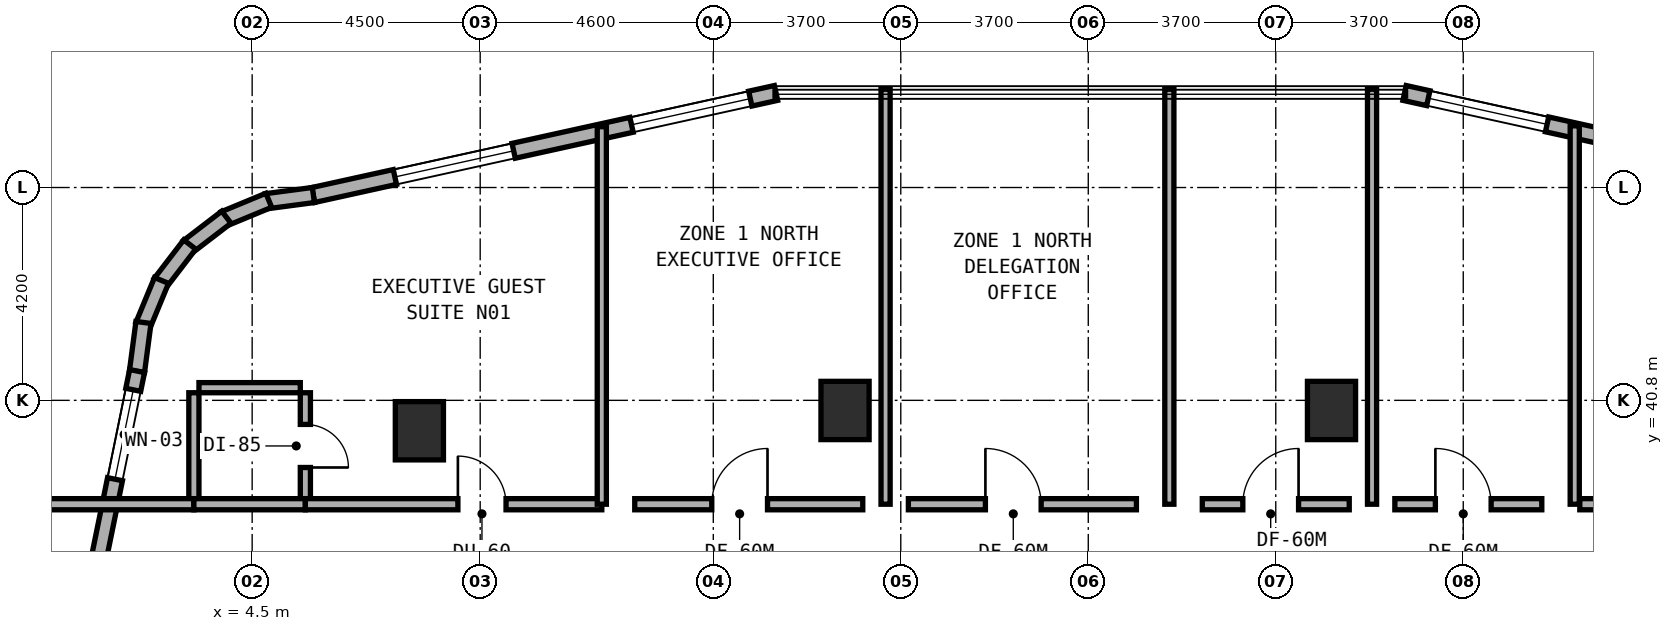
"""IFC4 building model, lengths in metres.
Left out: names, types, materials, properties, quantities, classifications, styles, units other than length and angle.
Written with IfcOpenShell. Run it as: python <this file> out.ifc"""

import sys

from ifc_helpers import new_model, si_unit, direction, frame, frame_2d, origin, origin_2d, place, context, subcontext, project, spatial, rectangle, extrude, element, fill, save


model = new_model("IFC4")
c1 = context("Model", 3, precision=1e-05, world=origin(), true_north=direction((0.0, 1.0)))
c2 = subcontext(c1, "Body", "Model", "MODEL_VIEW")
j1 = project(units=[si_unit("LENGTHUNIT", "METRE"), si_unit("PLANEANGLEUNIT", "RADIAN")], contexts=[c1])
p1 = place(None, origin())
s1 = spatial("IfcSite", under=j1, at=p1, CompositionType="ELEMENT")
p2 = place(p1, origin())
s2 = spatial("IfcBuilding", under=s1, at=p2, CompositionType="ELEMENT")
p3 = place(p2, frame((0.0, 0.0, 73.0)))
s3 = spatial("IfcBuildingStorey", under=s2, at=p3, CompositionType="ELEMENT", Elevation=73.0)
for number, where, z_axis, x_axis in (
    (1, (16.2, 40.6, 0.0), (0.0, 0.0, 1.0), (1.0, 0.0, 0.0)),
    (2, (25.8, 40.6, 0.0), (0.0, 0.0, 1.0), (1.0, 0.0, 0.0)),
    (3, (7.8, 40.2, 0.0), (0.0, 0.0, 1.0), (1.0, 0.0, 0.0)),
):
    element("IfcColumn", number, at=place(p3, frame(where, z_axis=z_axis, x_axis=x_axis)), inside=s3, PredefinedType="COLUMN", context=c2, shape_type="SweptSolid", body=[
        extrude(rectangle(XDim=0.95, YDim=1.15, at=origin_2d()), origin(), (0.0, 0.0, 1.0), 3.5),
    ])
p4 = place(p3, frame((36.376, 44.852, 0.0), z_axis=(0.0, 0.0, 1.0), x_axis=(-0.97654500432, 0.215313386808, 0.0)))
e4 = element("IfcWall", 4, at=p4, inside=s3, PredefinedType="STANDARD", context=c2, shape_type="SweptSolid", body=[
    extrude(rectangle(XDim=9.354, YDim=0.3, at=frame_2d((4.677, 0.0))), origin(), (0.0, 0.0, 1.0), 3.22),
])
p5 = place(p4, frame((1.692, 0.0, 0.8)))
e5 = element("IfcOpeningElement", 5, at=p5, cuts=e4, PredefinedType="OPENING", context=c2, shape_type="SweptSolid", body=[
    extrude(rectangle(XDim=2.4, YDim=1.6, at=frame_2d((1.2, 0.8))), frame((0.0, 0.16, 0.0), z_axis=(0.0, -1.0, 0.0), x_axis=(1.0, 0.0, 0.0)), (0.0, 0.0, 1.0), 0.32),
])
p6 = place(p4, frame((6.474, 0.0, 0.8)))
e6 = element("IfcOpeningElement", 6, at=p6, cuts=e4, PredefinedType="OPENING", context=c2, shape_type="SweptSolid", body=[
    extrude(rectangle(XDim=2.4, YDim=1.6, at=frame_2d((1.2, 0.8))), frame((0.0, 0.16, 0.0), z_axis=(0.0, -1.0, 0.0), x_axis=(1.0, 0.0, 0.0)), (0.0, 0.0, 1.0), 0.32),
])
p7 = place(p3, frame((14.838, 46.866, 0.0), z_axis=(0.0, 0.0, 1.0), x_axis=(-0.9765437942, -0.215318875183, 0.0)))
e7 = element("IfcWall", 7, at=p7, inside=s3, PredefinedType="STANDARD", context=c2, shape_type="SweptSolid", body=[
    extrude(rectangle(XDim=9.353, YDim=0.3, at=frame_2d((4.677, 0.0))), origin(), (0.0, 0.0, 1.0), 3.22),
])
p8 = place(p7, frame((0.52, 0.0, 0.8)))
e8 = element("IfcOpeningElement", 8, at=p8, cuts=e7, PredefinedType="OPENING", context=c2, shape_type="SweptSolid", body=[
    extrude(rectangle(XDim=2.4, YDim=1.6, at=frame_2d((1.2, 0.8))), frame((0.0, 0.16, 0.0), z_axis=(0.0, -1.0, 0.0), x_axis=(1.0, 0.0, 0.0)), (0.0, 0.0, 1.0), 0.32),
])
p9 = place(p7, frame((5.302, 0.0, 0.8)))
e9 = element("IfcOpeningElement", 9, at=p9, cuts=e7, PredefinedType="OPENING", context=c2, shape_type="SweptSolid", body=[
    extrude(rectangle(XDim=2.4, YDim=1.6, at=frame_2d((1.2, 0.8))), frame((0.0, 0.16, 0.0), z_axis=(0.0, -1.0, 0.0), x_axis=(1.0, 0.0, 0.0)), (0.0, 0.0, 1.0), 0.32),
])
p10 = place(p3, frame((5.708, 44.852, 0.0), z_axis=(0.0, 0.0, 1.0), x_axis=(-0.991359246108, -0.131174864804, 0.0)))
e10 = element("IfcWall", 10, at=p10, inside=s3, PredefinedType="STANDARD", context=c2, shape_type="SweptSolid", body=[
    extrude(rectangle(XDim=0.938, YDim=0.3, at=frame_2d((0.469, 0.0))), origin(), (0.0, 0.0, 1.0), 3.22),
])
p11 = place(p3, frame((4.828, 44.748, 0.0), z_axis=(0.0, 0.0, 1.0), x_axis=(-0.923982547689, -0.382434636986, 0.0)))
e11 = element("IfcWall", 11, at=p11, inside=s3, PredefinedType="STANDARD", context=c2, shape_type="SweptSolid", body=[
    extrude(rectangle(XDim=0.954, YDim=0.3, at=frame_2d((0.477, 0.0))), origin(), (0.0, 0.0, 1.0), 3.22),
])
for number, where, z_axis, x_axis in (
    (12, (3.991, 44.414, 0.0), (0.0, 0.0, 1.0), (-0.794, -0.608, 0.0)),
    (13, (3.268, 43.875, 0.0), (0.0, 0.0, 1.0), (-0.608, -0.794, 0.0)),
):
    element("IfcWall", number, at=place(p3, frame(where, z_axis=z_axis, x_axis=x_axis)), inside=s3, PredefinedType="STANDARD", context=c2, shape_type="SweptSolid", body=[
        extrude(rectangle(XDim=0.955, YDim=0.3, at=frame_2d((0.478, 0.0))), origin(), (0.0, 0.0, 1.0), 3.22),
    ])
p12 = place(p3, frame((2.711, 43.166, 0.0), z_axis=(0.0, 0.0, 1.0), x_axis=(-0.382344263057, -0.924019948111, 0.0)))
e14 = element("IfcWall", 14, at=p12, inside=s3, PredefinedType="STANDARD", context=c2, shape_type="SweptSolid", body=[
    extrude(rectangle(XDim=0.955, YDim=0.3, at=frame_2d((0.477, 0.0))), origin(), (0.0, 0.0, 1.0), 3.22),
])
p13 = place(p3, frame((2.355, 42.337, 0.0), z_axis=(0.0, 0.0, 1.0), x_axis=(-0.130454512571, -0.991454295543, 0.0)))
e15 = element("IfcWall", 15, at=p13, inside=s3, PredefinedType="STANDARD", context=c2, shape_type="SweptSolid", body=[
    extrude(rectangle(XDim=0.973, YDim=0.3, at=frame_2d((0.487, 0.0))), origin(), (0.0, 0.0, 1.0), 3.22),
])
p14 = place(p3, frame((2.229, 41.378, 0.0), z_axis=(0.0, 0.0, 1.0), x_axis=(-0.199990901713, -0.979797754249, 0.0)))
e16 = element("IfcWall", 16, at=p14, inside=s3, PredefinedType="STANDARD", context=c2, shape_type="SweptSolid", body=[
    extrude(rectangle(XDim=10.065, YDim=0.3, at=frame_2d((5.033, 0.0))), origin(), (0.0, 0.0, 1.0), 3.22),
])
p15 = place(p14, frame((0.378, 0.0, 0.85)))
e17 = element("IfcOpeningElement", 17, at=p15, cuts=e16, PredefinedType="OPENING", context=c2, shape_type="SweptSolid", body=[
    extrude(rectangle(XDim=1.8, YDim=1.5, at=frame_2d((0.9, 0.75))), frame((0.0, 0.16, 0.0), z_axis=(0.0, -1.0, 0.0), x_axis=(1.0, 0.0, 0.0)), (0.0, 0.0, 1.0), 0.32),
])
p16 = place(p14, frame((5.236, 0.0, 0.8)))
e18 = element("IfcOpeningElement", 18, at=p16, cuts=e16, PredefinedType="OPENING", context=c2, shape_type="SweptSolid", body=[
    extrude(rectangle(XDim=2.4, YDim=1.6, at=frame_2d((1.2, 0.8))), frame((0.0, 0.16, 0.0), z_axis=(0.0, -1.0, 0.0), x_axis=(1.0, 0.0, 0.0)), (0.0, 0.0, 1.0), 0.32),
])
p17 = place(p3, frame((5.55, 38.85, 0.0), z_axis=(0.0, 0.0, 1.0), x_axis=(0.0, 1.0, 0.0)))
e19 = element("IfcWall", 19, at=p17, inside=s3, PredefinedType="PLUMBINGWALL", context=c2, shape_type="SweptSolid", body=[
    extrude(rectangle(XDim=2.1, YDim=0.2, at=frame_2d((1.05, 0.0))), origin(), (0.0, 0.0, 1.0), 3.22),
])
p18 = place(p17, frame((0.625, 0.0, 0.0)))
e20 = element("IfcOpeningElement", 20, at=p18, cuts=e19, PredefinedType="OPENING", context=c2, shape_type="SweptSolid", body=[
    extrude(rectangle(XDim=0.85, YDim=2.1, at=frame_2d((0.425, 1.05))), frame((0.0, 0.11, 0.0), z_axis=(0.0, -1.0, 0.0), x_axis=(1.0, 0.0, 0.0)), (0.0, 0.0, 1.0), 0.22),
])
p19 = place(p3, frame((3.45, 41.05, 0.0), z_axis=(0.0, 0.0, 1.0), x_axis=(1.0, 0.0, 0.0)))
e21 = element("IfcWall", 21, at=p19, inside=s3, PredefinedType="PLUMBINGWALL", context=c2, shape_type="SweptSolid", body=[
    extrude(rectangle(XDim=2.0, YDim=0.2, at=frame_2d((1.0, 0.0))), origin(), (0.0, 0.0, 1.0), 3.22),
])
p20 = place(p3, frame((3.35, 38.85, 0.0), z_axis=(0.0, 0.0, 1.0), x_axis=(0.0, 1.0, 0.0)))
e22 = element("IfcWall", 22, at=p20, inside=s3, PredefinedType="PLUMBINGWALL", context=c2, shape_type="SweptSolid", body=[
    extrude(rectangle(XDim=2.1, YDim=0.2, at=frame_2d((1.05, 0.0))), origin(), (0.0, 0.0, 1.0), 3.22),
])
p21 = place(p3, frame((0.24, 38.75, 0.0), z_axis=(0.0, 0.0, 1.0), x_axis=(1.0, 0.0, 0.0)))
e23 = element("IfcWall", 23, at=p21, inside=s3, PredefinedType="SOLIDWALL", context=c2, shape_type="SweptSolid", body=[
    extrude(rectangle(XDim=3.11, YDim=0.22, at=frame_2d((1.555, 0.0))), origin(), (0.0, 0.0, 1.0), 3.22),
])
p22 = place(p3, frame((3.35, 38.75, 0.0), z_axis=(0.0, 0.0, 1.0), x_axis=(1.0, 0.0, 0.0)))
e24 = element("IfcWall", 24, at=p22, inside=s3, PredefinedType="SOLIDWALL", context=c2, shape_type="SweptSolid", body=[
    extrude(rectangle(XDim=2.2, YDim=0.22, at=frame_2d((1.1, 0.0))), origin(), (0.0, 0.0, 1.0), 3.22),
])
p23 = place(p3, frame((5.55, 38.75, 0.0), z_axis=(0.0, 0.0, 1.0), x_axis=(1.0, 0.0, 0.0)))
e25 = element("IfcWall", 25, at=p23, inside=s3, PredefinedType="SOLIDWALL", context=c2, shape_type="SweptSolid", body=[
    extrude(rectangle(XDim=5.85, YDim=0.22, at=frame_2d((2.925, 0.0))), origin(), (0.0, 0.0, 1.0), 2.495),
])
p24 = place(p23, frame((3.01, 0.0, 0.0)))
e26 = element("IfcOpeningElement", 26, at=p24, cuts=e25, PredefinedType="OPENING", context=c2, shape_type="SweptSolid", body=[
    extrude(rectangle(XDim=0.95, YDim=2.1, at=frame_2d((0.475, 1.05))), frame((0.0, 0.12, 0.0), z_axis=(0.0, -1.0, 0.0), x_axis=(1.0, 0.0, 0.0)), (0.0, 0.0, 1.0), 0.24),
])
p25 = place(p3, frame((11.4, 38.75, 0.0), z_axis=(0.0, 0.0, 1.0), x_axis=(0.0, 1.0, 0.0)))
e27 = element("IfcWall", 27, at=p25, inside=s3, PredefinedType="SOLIDWALL", context=c2, shape_type="SweptSolid", body=[
    extrude(rectangle(XDim=7.45, YDim=0.18, at=frame_2d((3.725, 0.0))), origin(), (0.0, 0.0, 1.0), 2.745),
])
p26 = place(p3, frame((17.0, 38.75, 0.0), z_axis=(0.0, 0.0, 1.0), x_axis=(0.0, 1.0, 0.0)))
e28 = element("IfcWall", 28, at=p26, inside=s3, PredefinedType="SOLIDWALL", context=c2, shape_type="SweptSolid", body=[
    extrude(rectangle(XDim=8.19, YDim=0.18, at=frame_2d((4.095, 0.0))), origin(), (0.0, 0.0, 1.0), 2.745),
])
p27 = place(p3, frame((12.05, 38.75, 0.0), z_axis=(0.0, 0.0, 1.0), x_axis=(1.0, 0.0, 0.0)))
e29 = element("IfcWall", 29, at=p27, inside=s3, PredefinedType="SOLIDWALL", context=c2, shape_type="SweptSolid", body=[
    extrude(rectangle(XDim=4.5, YDim=0.22, at=frame_2d((2.25, 0.0))), origin(), (0.0, 0.0, 1.0), 2.495),
])
p28 = place(p27, frame((1.52, 0.0, 0.0)))
e30 = element("IfcOpeningElement", 30, at=p28, cuts=e29, PredefinedType="OPENING", context=c2, shape_type="SweptSolid", body=[
    extrude(rectangle(XDim=1.1, YDim=2.1, at=frame_2d((0.55, 1.05))), frame((0.0, 0.12, 0.0), z_axis=(0.0, -1.0, 0.0), x_axis=(1.0, 0.0, 0.0)), (0.0, 0.0, 1.0), 0.24),
])
p29 = place(p3, frame((17.45, 38.75, 0.0), z_axis=(0.0, 0.0, 1.0), x_axis=(1.0, 0.0, 0.0)))
e31 = element("IfcWall", 31, at=p29, inside=s3, PredefinedType="SOLIDWALL", context=c2, shape_type="SweptSolid", body=[
    extrude(rectangle(XDim=4.5, YDim=0.22, at=frame_2d((2.25, 0.0))), origin(), (0.0, 0.0, 1.0), 2.955),
])
p30 = place(p29, frame((1.52, 0.0, 0.0)))
e32 = element("IfcOpeningElement", 32, at=p30, cuts=e31, PredefinedType="OPENING", context=c2, shape_type="SweptSolid", body=[
    extrude(rectangle(XDim=1.1, YDim=2.1, at=frame_2d((0.55, 1.05))), frame((0.0, 0.12, 0.0), z_axis=(0.0, -1.0, 0.0), x_axis=(1.0, 0.0, 0.0)), (0.0, 0.0, 1.0), 0.24),
])
p31 = place(p3, frame((22.6, 38.75, 0.0), z_axis=(0.0, 0.0, 1.0), x_axis=(0.0, 1.0, 0.0)))
e33 = element("IfcWall", 33, at=p31, inside=s3, PredefinedType="SOLIDWALL", context=c2, shape_type="SweptSolid", body=[
    extrude(rectangle(XDim=8.19, YDim=0.18, at=frame_2d((4.095, 0.0))), origin(), (0.0, 0.0, 1.0), 2.745),
])
p32 = place(p3, frame((26.6, 38.75, 0.0), z_axis=(0.0, 0.0, 1.0), x_axis=(0.0, 1.0, 0.0)))
e34 = element("IfcWall", 34, at=p32, inside=s3, PredefinedType="SOLIDWALL", context=c2, shape_type="SweptSolid", body=[
    extrude(rectangle(XDim=8.19, YDim=0.18, at=frame_2d((4.095, 0.0))), origin(), (0.0, 0.0, 1.0), 2.495),
])
p33 = place(p3, frame((23.25, 38.75, 0.0), z_axis=(0.0, 0.0, 1.0), x_axis=(1.0, 0.0, 0.0)))
e35 = element("IfcWall", 35, at=p33, inside=s3, PredefinedType="SOLIDWALL", context=c2, shape_type="SweptSolid", body=[
    extrude(rectangle(XDim=2.9, YDim=0.22, at=frame_2d((1.45, 0.0))), origin(), (0.0, 0.0, 1.0), 2.495),
])
p34 = place(p33, frame((0.8, 0.0, 0.0)))
e36 = element("IfcOpeningElement", 36, at=p34, cuts=e35, PredefinedType="OPENING", context=c2, shape_type="SweptSolid", body=[
    extrude(rectangle(XDim=1.1, YDim=2.1, at=frame_2d((0.55, 1.05))), frame((0.0, 0.12, 0.0), z_axis=(0.0, -1.0, 0.0), x_axis=(1.0, 0.0, 0.0)), (0.0, 0.0, 1.0), 0.24),
])
p35 = place(p3, frame((27.05, 38.75, 0.0), z_axis=(0.0, 0.0, 1.0), x_axis=(1.0, 0.0, 0.0)))
e37 = element("IfcWall", 37, at=p35, inside=s3, PredefinedType="SOLIDWALL", context=c2, shape_type="SweptSolid", body=[
    extrude(rectangle(XDim=2.9, YDim=0.22, at=frame_2d((1.45, 0.0))), origin(), (0.0, 0.0, 1.0), 2.955),
])
p36 = place(p35, frame((0.8, 0.0, 0.0)))
e38 = element("IfcOpeningElement", 38, at=p36, cuts=e37, PredefinedType="OPENING", context=c2, shape_type="SweptSolid", body=[
    extrude(rectangle(XDim=1.1, YDim=2.1, at=frame_2d((0.55, 1.05))), frame((0.0, 0.12, 0.0), z_axis=(0.0, -1.0, 0.0), x_axis=(1.0, 0.0, 0.0)), (0.0, 0.0, 1.0), 0.24),
])
p37 = place(p3, frame((30.6, 38.75, 0.0), z_axis=(0.0, 0.0, 1.0), x_axis=(0.0, 1.0, 0.0)))
e39 = element("IfcWall", 39, at=p37, inside=s3, PredefinedType="SOLIDWALL", context=c2, shape_type="SweptSolid", body=[
    extrude(rectangle(XDim=7.467, YDim=0.18, at=frame_2d((3.733, 0.0))), origin(), (0.0, 0.0, 1.0), 2.745),
])
p38 = place(p3, frame((30.7, 38.75, 0.0), z_axis=(0.0, 0.0, 1.0), x_axis=(1.0, 0.0, 0.0)))
e40 = element("IfcWall", 40, at=p38, inside=s3, PredefinedType="SOLIDWALL", context=c2, shape_type="SweptSolid", body=[
    extrude(rectangle(XDim=11.04, YDim=0.22, at=frame_2d((5.52, 0.0))), origin(), (0.0, 0.0, 1.0), 2.495),
])
p39 = place(p38, frame((4.531, 0.0, 0.0)))
e41 = element("IfcOpeningElement", 41, at=p39, cuts=e40, PredefinedType="OPENING", context=c2, shape_type="SweptSolid", body=[
    extrude(rectangle(XDim=0.95, YDim=2.1, at=frame_2d((0.475, 1.05))), frame((0.0, 0.12, 0.0), z_axis=(0.0, -1.0, 0.0), x_axis=(1.0, 0.0, 0.0)), (0.0, 0.0, 1.0), 0.24),
])
p40 = place(p6, origin())
e42 = element("IfcWindow", 42, at=p40, inside=s3, PartitioningType="SINGLE_PANEL", PredefinedType="WINDOW", context=c2, shape_type="SweptSolid", body=[
    extrude(rectangle(XDim=2.4, YDim=1.6, at=frame_2d((1.2, 0.8))), frame((0.0, 0.03, 0.0), z_axis=(0.0, -1.0, 0.0), x_axis=(1.0, 0.0, 0.0)), (0.0, 0.0, 1.0), 0.06),
])
fill(e6, e42)
p41 = place(p8, origin())
e43 = element("IfcWindow", 43, at=p41, inside=s3, PartitioningType="SINGLE_PANEL", PredefinedType="WINDOW", context=c2, shape_type="SweptSolid", body=[
    extrude(rectangle(XDim=2.4, YDim=1.6, at=frame_2d((1.2, 0.8))), frame((0.0, 0.03, 0.0), z_axis=(0.0, -1.0, 0.0), x_axis=(1.0, 0.0, 0.0)), (0.0, 0.0, 1.0), 0.06),
])
fill(e8, e43)
p42 = place(p9, origin())
e44 = element("IfcWindow", 44, at=p42, inside=s3, PartitioningType="SINGLE_PANEL", PredefinedType="WINDOW", context=c2, shape_type="SweptSolid", body=[
    extrude(rectangle(XDim=2.4, YDim=1.6, at=frame_2d((1.2, 0.8))), frame((0.0, 0.03, 0.0), z_axis=(0.0, -1.0, 0.0), x_axis=(1.0, 0.0, 0.0)), (0.0, 0.0, 1.0), 0.06),
])
fill(e9, e44)
p43 = place(p15, origin())
e45 = element("IfcWindow", 45, at=p43, inside=s3, PartitioningType="SINGLE_PANEL", PredefinedType="WINDOW", context=c2, shape_type="SweptSolid", body=[
    extrude(rectangle(XDim=1.8, YDim=1.5, at=frame_2d((0.9, 0.75))), frame((0.0, 0.03, 0.0), z_axis=(0.0, -1.0, 0.0), x_axis=(1.0, 0.0, 0.0)), (0.0, 0.0, 1.0), 0.06),
])
fill(e17, e45)
p44 = place(p18, frame((0.85, 0.0, 0.0), z_axis=(0.0, 0.0, 1.0), x_axis=(-1.0, 0.0, 0.0)))
e46 = element("IfcDoor", 46, at=p44, inside=s3, OperationType="SINGLE_SWING_RIGHT", PredefinedType="DOOR", context=c2, shape_type="SweptSolid", body=[
    extrude(rectangle(XDim=0.85, YDim=2.1, at=frame_2d((0.425, 1.05))), frame((0.0, 0.025, 0.0), z_axis=(0.0, -1.0, 0.0), x_axis=(1.0, 0.0, 0.0)), (0.0, 0.0, 1.0), 0.05),
])
fill(e20, e46)
p45 = place(p24, origin())
e47 = element("IfcDoor", 47, at=p45, inside=s3, OperationType="SINGLE_SWING_LEFT", PredefinedType="DOOR", context=c2, shape_type="SweptSolid", body=[
    extrude(rectangle(XDim=0.95, YDim=2.1, at=frame_2d((0.475, 1.05))), frame((0.0, 0.025, 0.0), z_axis=(0.0, -1.0, 0.0), x_axis=(1.0, 0.0, 0.0)), (0.0, 0.0, 1.0), 0.05),
])
fill(e26, e47)
p46 = place(p28, origin())
e48 = element("IfcDoor", 48, at=p46, inside=s3, OperationType="SINGLE_SWING_RIGHT", PredefinedType="DOOR", context=c2, shape_type="SweptSolid", body=[
    extrude(rectangle(XDim=1.1, YDim=2.1, at=frame_2d((0.55, 1.05))), frame((0.0, 0.025, 0.0), z_axis=(0.0, -1.0, 0.0), x_axis=(1.0, 0.0, 0.0)), (0.0, 0.0, 1.0), 0.05),
])
fill(e30, e48)
p47 = place(p30, origin())
e49 = element("IfcDoor", 49, at=p47, inside=s3, OperationType="SINGLE_SWING_LEFT", PredefinedType="DOOR", context=c2, shape_type="SweptSolid", body=[
    extrude(rectangle(XDim=1.1, YDim=2.1, at=frame_2d((0.55, 1.05))), frame((0.0, 0.025, 0.0), z_axis=(0.0, -1.0, 0.0), x_axis=(1.0, 0.0, 0.0)), (0.0, 0.0, 1.0), 0.05),
])
fill(e32, e49)
p48 = place(p34, origin())
e50 = element("IfcDoor", 50, at=p48, inside=s3, OperationType="SINGLE_SWING_RIGHT", PredefinedType="DOOR", context=c2, shape_type="SweptSolid", body=[
    extrude(rectangle(XDim=1.1, YDim=2.1, at=frame_2d((0.55, 1.05))), frame((0.0, 0.025, 0.0), z_axis=(0.0, -1.0, 0.0), x_axis=(1.0, 0.0, 0.0)), (0.0, 0.0, 1.0), 0.05),
])
fill(e36, e50)
p49 = place(p36, origin())
e51 = element("IfcDoor", 51, at=p49, inside=s3, OperationType="SINGLE_SWING_LEFT", PredefinedType="DOOR", context=c2, shape_type="SweptSolid", body=[
    extrude(rectangle(XDim=1.1, YDim=2.1, at=frame_2d((0.55, 1.05))), frame((0.0, 0.025, 0.0), z_axis=(0.0, -1.0, 0.0), x_axis=(1.0, 0.0, 0.0)), (0.0, 0.0, 1.0), 0.05),
])
fill(e38, e51)
save(model, sys.argv[1])
